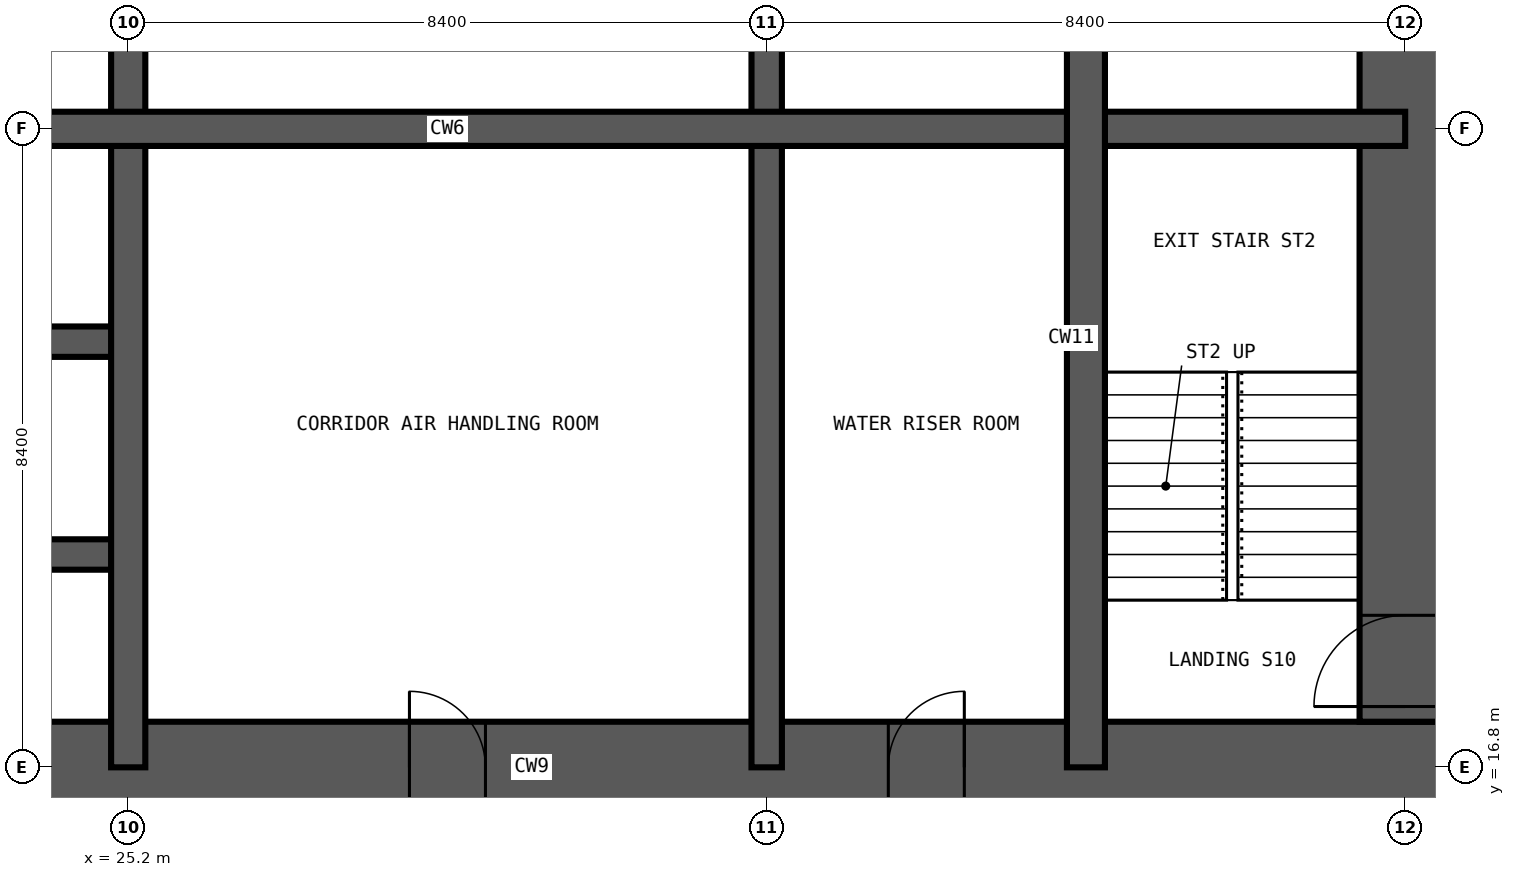
"""IFC4 building model, lengths in metres.
Left out: names, types, materials, properties, quantities, classifications, styles, units other than length and angle.
Written with IfcOpenShell. Run it as: python <this file> out.ifc"""

import sys

from ifc_helpers import new_model, si_unit, direction, frame, frame_2d, origin, place, context, subcontext, project, spatial, rectangle, extrude, element, fill, save


model = new_model("IFC4")
c1 = context("Model", 3, precision=1e-05, world=origin(), true_north=direction((0.0, 1.0)))
c2 = subcontext(c1, "Body", "Model", "MODEL_VIEW")
j1 = project(units=[si_unit("LENGTHUNIT", "METRE"), si_unit("PLANEANGLEUNIT", "RADIAN")], contexts=[c1])
p1 = place(None, origin())
s1 = spatial("IfcSite", under=j1, at=p1, CompositionType="ELEMENT")
p2 = place(p1, origin())
s2 = spatial("IfcBuilding", under=s1, at=p2, CompositionType="ELEMENT")
p3 = place(p2, frame((0.0, 0.0, 162.6)))
s3 = spatial("IfcBuildingStorey", under=s2, at=p3, CompositionType="ELEMENT", Elevation=162.6)
p4 = place(p3, frame((16.2, 16.8, -0.35), z_axis=(0.0, 0.0, 1.0), x_axis=(1.0, 0.0, 0.0)))
e1 = element("IfcWall", 1, at=p4, inside=s3, PredefinedType="SHEAR", context=c2, shape_type="SweptSolid", body=[
    extrude(rectangle(XDim=26.4, YDim=1.2, at=frame_2d((13.2, 0.0))), origin(), (0.0, 0.0, 1.0), 3.6),
])
p5 = place(p4, frame((12.7, 0.0, 0.35)))
e2 = element("IfcOpeningElement", 2, at=p5, cuts=e1, PredefinedType="OPENING", context=c2, shape_type="SweptSolid", body=[
    extrude(rectangle(XDim=1.0, YDim=2.1, at=frame_2d((0.5, 1.05))), frame((0.0, 0.61, 0.0), z_axis=(0.0, -1.0, 0.0), x_axis=(1.0, 0.0, 0.0)), (0.0, 0.0, 1.0), 1.22),
])
p6 = place(p4, frame((19.0, 0.0, 0.35)))
e3 = element("IfcOpeningElement", 3, at=p6, cuts=e1, PredefinedType="OPENING", context=c2, shape_type="SweptSolid", body=[
    extrude(rectangle(XDim=1.0, YDim=2.1, at=frame_2d((0.5, 1.05))), frame((0.0, 0.61, 0.0), z_axis=(0.0, -1.0, 0.0), x_axis=(1.0, 0.0, 0.0)), (0.0, 0.0, 1.0), 1.22),
])
p7 = place(p3, frame((42.0, 17.4, -0.35), z_axis=(0.0, 0.0, 1.0), x_axis=(0.0, 1.0, 0.0)))
e4 = element("IfcWall", 4, at=p7, inside=s3, PredefinedType="SHEAR", context=c2, shape_type="SweptSolid", body=[
    extrude(rectangle(XDim=24.0, YDim=1.2, at=frame_2d((12.0, 0.0))), origin(), (0.0, 0.0, 1.0), 3.6),
])
p8 = place(p7, frame((0.2, 0.0, 0.35)))
e5 = element("IfcOpeningElement", 5, at=p8, cuts=e4, PredefinedType="OPENING", context=c2, shape_type="SweptSolid", body=[
    extrude(rectangle(XDim=1.2, YDim=2.2, at=frame_2d((0.6, 1.1))), frame((0.0, 0.61, 0.0), z_axis=(0.0, -1.0, 0.0), x_axis=(1.0, 0.0, 0.0)), (0.0, 0.0, 1.0), 1.22),
])
p9 = place(p7, frame((11.5, 0.0, 0.35)))
e6 = element("IfcOpeningElement", 6, at=p9, cuts=e4, PredefinedType="OPENING", context=c2, shape_type="SweptSolid", body=[
    extrude(rectangle(XDim=1.0, YDim=2.1, at=frame_2d((0.5, 1.05))), frame((0.0, 0.61, 0.0), z_axis=(0.0, -1.0, 0.0), x_axis=(1.0, 0.0, 0.0)), (0.0, 0.0, 1.0), 1.22),
])
p10 = place(p7, frame((19.9, 0.0, 0.35)))
e7 = element("IfcOpeningElement", 7, at=p10, cuts=e4, PredefinedType="OPENING", context=c2, shape_type="SweptSolid", body=[
    extrude(rectangle(XDim=1.0, YDim=2.1, at=frame_2d((0.5, 1.05))), frame((0.0, 0.61, 0.0), z_axis=(0.0, -1.0, 0.0), x_axis=(1.0, 0.0, 0.0)), (0.0, 0.0, 1.0), 1.22),
])
p11 = place(p3, frame((33.6, 16.8, -0.35), z_axis=(0.0, 0.0, 1.0), x_axis=(0.0, 1.0, 0.0)))
e8 = element("IfcWall", 8, at=p11, inside=s3, PredefinedType="SHEAR", context=c2, shape_type="SweptSolid", body=[
    extrude(rectangle(XDim=25.2, YDim=0.4, at=frame_2d((12.6, 0.0))), origin(), (0.0, 0.0, 1.0), 3.6),
])
p12 = place(p11, frame((22.5, 0.0, 0.35)))
e9 = element("IfcOpeningElement", 9, at=p12, cuts=e8, PredefinedType="OPENING", context=c2, shape_type="SweptSolid", body=[
    extrude(rectangle(XDim=1.2, YDim=2.2, at=frame_2d((0.6, 1.1))), frame((0.0, 0.21, 0.0), z_axis=(0.0, -1.0, 0.0), x_axis=(1.0, 0.0, 0.0)), (0.0, 0.0, 1.0), 0.42),
])
p13 = place(p11, frame((18.3, 0.0, 0.35)))
e10 = element("IfcOpeningElement", 10, at=p13, cuts=e8, PredefinedType="OPENING", context=c2, shape_type="SweptSolid", body=[
    extrude(rectangle(XDim=1.2, YDim=2.2, at=frame_2d((0.6, 1.1))), frame((0.0, 0.21, 0.0), z_axis=(0.0, -1.0, 0.0), x_axis=(1.0, 0.0, 0.0)), (0.0, 0.0, 1.0), 0.42),
])
p14 = place(p11, frame((12.1, 0.0, 0.35)))
e11 = element("IfcOpeningElement", 11, at=p14, cuts=e8, PredefinedType="OPENING", context=c2, shape_type="SweptSolid", body=[
    extrude(rectangle(XDim=1.0, YDim=2.1, at=frame_2d((0.5, 1.05))), frame((0.0, 0.21, 0.0), z_axis=(0.0, -1.0, 0.0), x_axis=(1.0, 0.0, 0.0)), (0.0, 0.0, 1.0), 0.42),
])
p15 = place(p3, frame((16.8, 19.6, -0.35), z_axis=(0.0, 0.0, 1.0), x_axis=(1.0, 0.0, 0.0)))
e12 = element("IfcWall", 12, at=p15, inside=s3, PredefinedType="SHEAR", context=c2, shape_type="SweptSolid", body=[
    extrude(rectangle(XDim=8.4, YDim=0.4, at=frame_2d((4.2, 0.0))), origin(), (0.0, 0.0, 1.0), 3.6),
])
p16 = place(p15, frame((1.6, 0.0, 0.35)))
e13 = element("IfcOpeningElement", 13, at=p16, cuts=e12, PredefinedType="OPENING", context=c2, shape_type="SweptSolid", body=[
    extrude(rectangle(XDim=1.0, YDim=2.1, at=frame_2d((0.5, 1.05))), frame((0.0, 0.21, 0.0), z_axis=(0.0, -1.0, 0.0), x_axis=(1.0, 0.0, 0.0)), (0.0, 0.0, 1.0), 0.42),
])
p17 = place(p15, frame((5.8, 0.0, 0.35)))
e14 = element("IfcOpeningElement", 14, at=p17, cuts=e12, PredefinedType="OPENING", context=c2, shape_type="SweptSolid", body=[
    extrude(rectangle(XDim=1.0, YDim=2.1, at=frame_2d((0.5, 1.05))), frame((0.0, 0.21, 0.0), z_axis=(0.0, -1.0, 0.0), x_axis=(1.0, 0.0, 0.0)), (0.0, 0.0, 1.0), 0.42),
])
p18 = place(p3, frame((16.8, 22.4, -0.35), z_axis=(0.0, 0.0, 1.0), x_axis=(1.0, 0.0, 0.0)))
e15 = element("IfcWall", 15, at=p18, inside=s3, PredefinedType="SHEAR", context=c2, shape_type="SweptSolid", body=[
    extrude(rectangle(XDim=8.4, YDim=0.4, at=frame_2d((4.2, 0.0))), origin(), (0.0, 0.0, 1.0), 3.6),
])
p19 = place(p18, frame((1.6, 0.0, 0.35)))
e16 = element("IfcOpeningElement", 16, at=p19, cuts=e15, PredefinedType="OPENING", context=c2, shape_type="SweptSolid", body=[
    extrude(rectangle(XDim=1.0, YDim=2.1, at=frame_2d((0.5, 1.05))), frame((0.0, 0.21, 0.0), z_axis=(0.0, -1.0, 0.0), x_axis=(1.0, 0.0, 0.0)), (0.0, 0.0, 1.0), 0.42),
])
p20 = place(p18, frame((5.8, 0.0, 0.35)))
e17 = element("IfcOpeningElement", 17, at=p20, cuts=e15, PredefinedType="OPENING", context=c2, shape_type="SweptSolid", body=[
    extrude(rectangle(XDim=1.0, YDim=2.1, at=frame_2d((0.5, 1.05))), frame((0.0, 0.21, 0.0), z_axis=(0.0, -1.0, 0.0), x_axis=(1.0, 0.0, 0.0)), (0.0, 0.0, 1.0), 0.42),
])
for number, where, z_axis, x_axis in (
    (18, (25.2, 16.8, -0.35), (0.0, 0.0, 1.0), (0.0, 1.0, 0.0)),
    (19, (16.8, 25.2, -0.35), (0.0, 0.0, 1.0), (1.0, 0.0, 0.0)),
):
    element("IfcWall", number, at=place(p3, frame(where, z_axis=z_axis, x_axis=x_axis)), inside=s3, PredefinedType="SHEAR", context=c2, shape_type="SweptSolid", body=[
        extrude(rectangle(XDim=25.2, YDim=0.45, at=frame_2d((12.6, 0.0))), origin(), (0.0, 0.0, 1.0), 3.6),
    ])
p21 = place(p3, frame((37.8, 16.8, -0.35), z_axis=(0.0, 0.0, 1.0), x_axis=(0.0, 1.0, 0.0)))
e20 = element("IfcWall", 20, at=p21, inside=s3, PredefinedType="SHEAR", context=c2, shape_type="SweptSolid", body=[
    extrude(rectangle(XDim=11.2, YDim=0.5, at=frame_2d((5.6, 0.0))), origin(), (0.0, 0.0, 1.0), 3.6),
])
p22 = place(p8, origin())
e21 = element("IfcDoor", 21, at=p22, inside=s3, OperationType="SINGLE_SWING_LEFT", PredefinedType="DOOR", context=c2, shape_type="SweptSolid", body=[
    extrude(rectangle(XDim=1.2, YDim=2.2, at=frame_2d((0.6, 1.1))), frame((0.0, 0.025, 0.0), z_axis=(0.0, -1.0, 0.0), x_axis=(1.0, 0.0, 0.0)), (0.0, 0.0, 1.0), 0.05),
])
fill(e5, e21)
p23 = place(p5, origin())
e22 = element("IfcDoor", 22, at=p23, inside=s3, OperationType="SINGLE_SWING_LEFT", PredefinedType="DOOR", context=c2, shape_type="SweptSolid", body=[
    extrude(rectangle(XDim=1.0, YDim=2.1, at=frame_2d((0.5, 1.05))), frame((0.0, 0.025, 0.0), z_axis=(0.0, -1.0, 0.0), x_axis=(1.0, 0.0, 0.0)), (0.0, 0.0, 1.0), 0.05),
])
fill(e2, e22)
p24 = place(p6, origin())
e23 = element("IfcDoor", 23, at=p24, inside=s3, OperationType="SINGLE_SWING_RIGHT", PredefinedType="DOOR", context=c2, shape_type="SweptSolid", body=[
    extrude(rectangle(XDim=1.0, YDim=2.1, at=frame_2d((0.5, 1.05))), frame((0.0, 0.025, 0.0), z_axis=(0.0, -1.0, 0.0), x_axis=(1.0, 0.0, 0.0)), (0.0, 0.0, 1.0), 0.05),
])
fill(e3, e23)
save(model, sys.argv[1])
